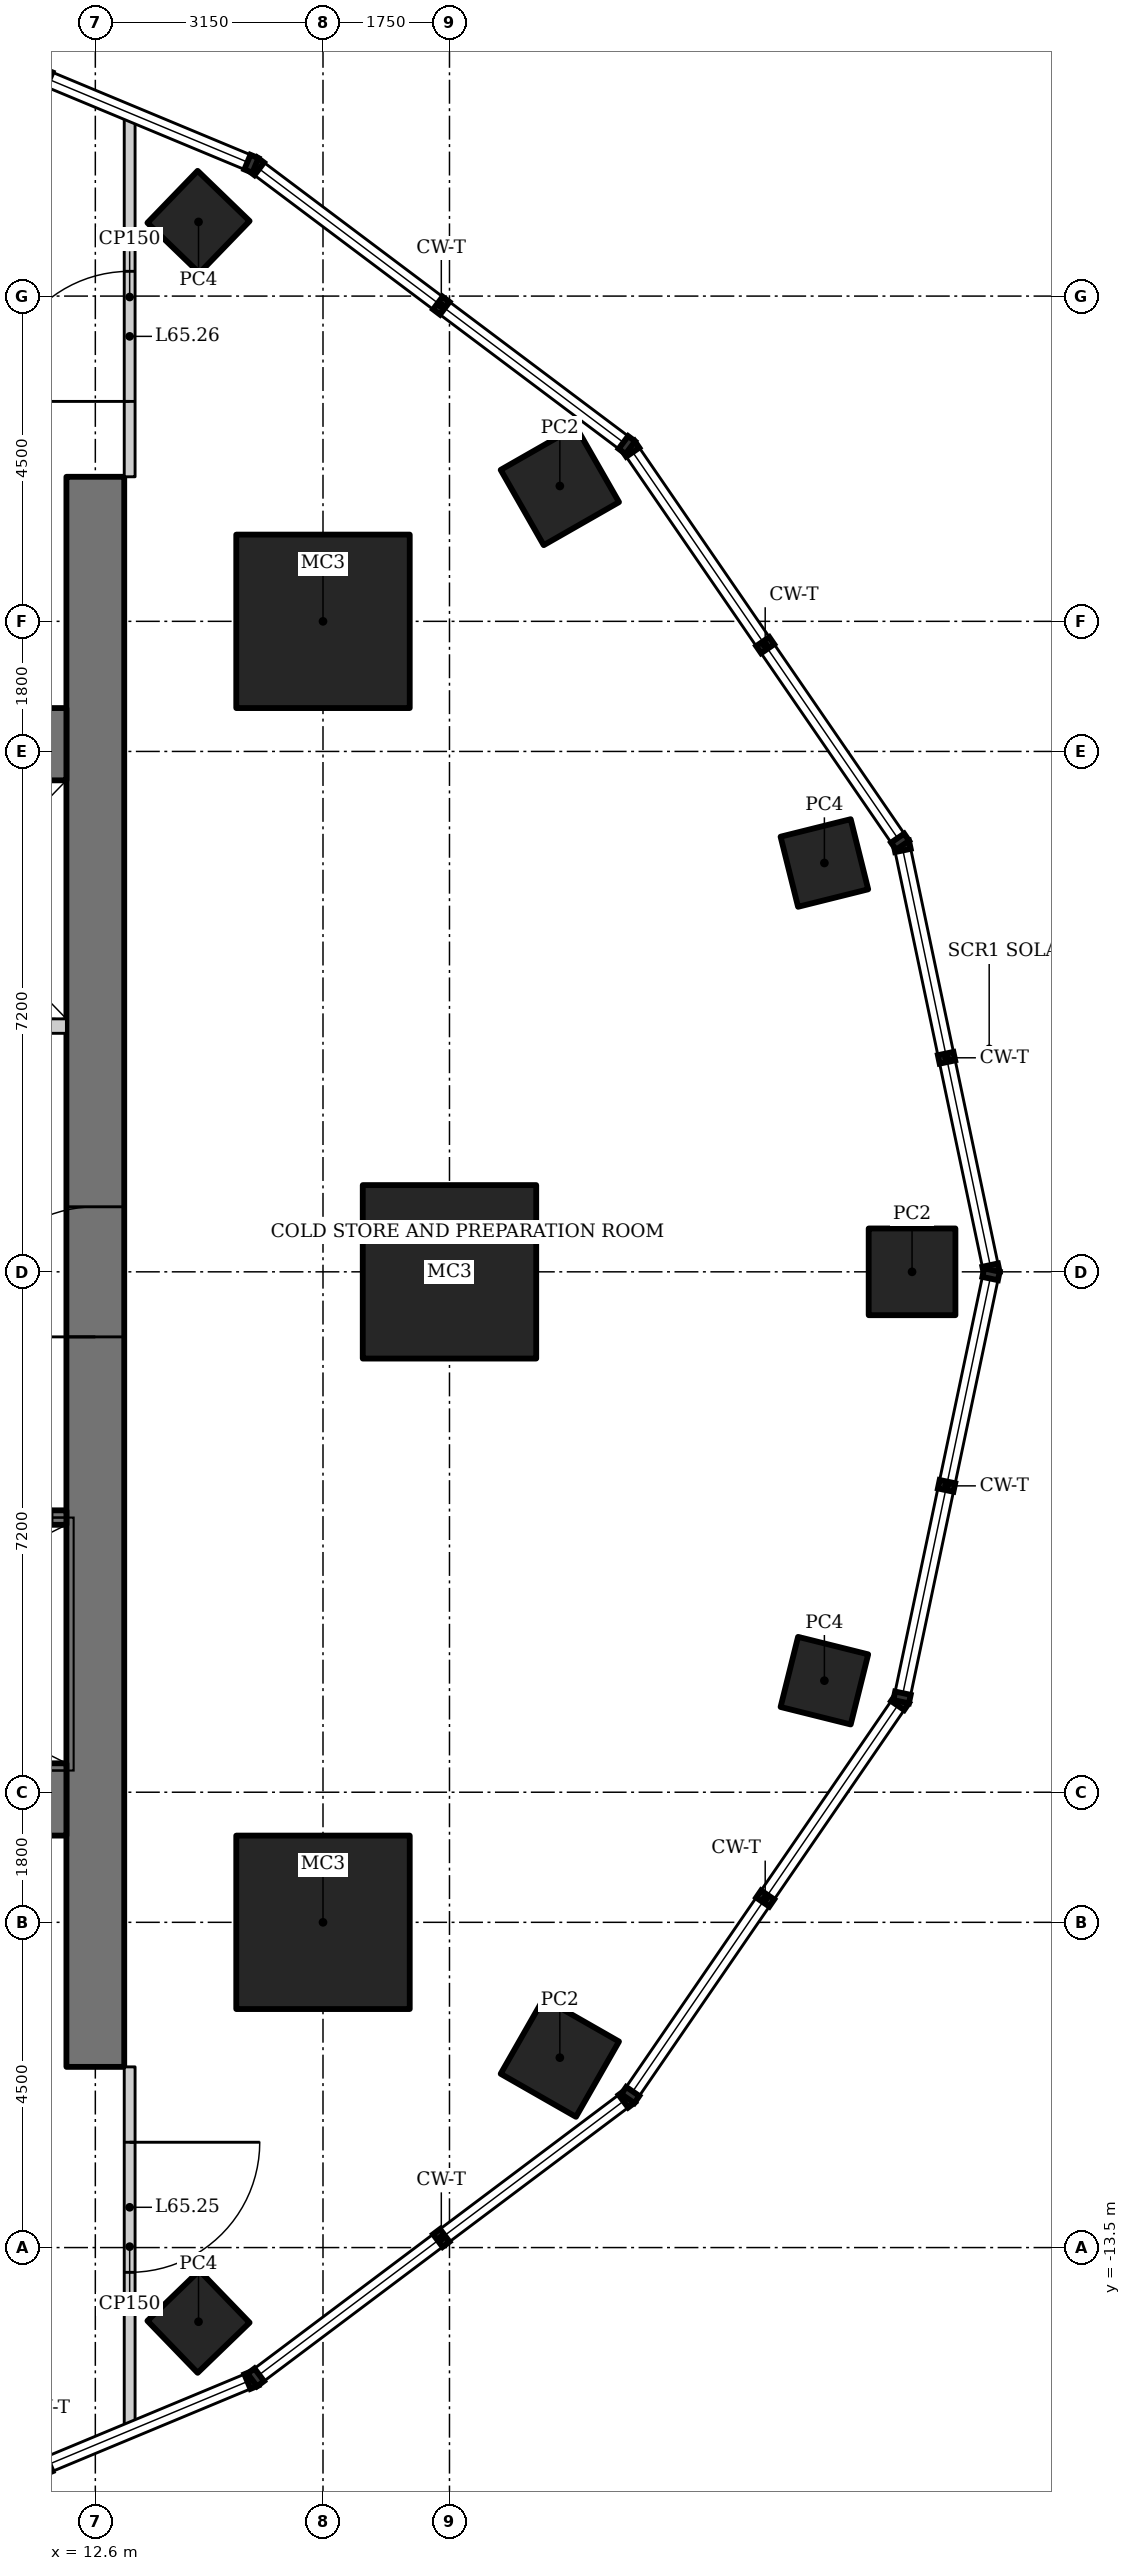
"""IFC4 building model, lengths in metres.
Left out: names, types, materials, properties, quantities, classifications, styles, units other than length and angle.
Written with IfcOpenShell. Run it as: python <this file> out.ifc"""

import sys

from ifc_helpers import new_model, si_unit, direction, frame, frame_2d, origin, origin_2d, place, context, subcontext, project, spatial, rectangle, hollow_rectangle, extrude, element, fill, save


model = new_model("IFC4")
c1 = context("Model", 3, precision=1e-05, world=origin(), true_north=direction((0.0, 1.0)))
c2 = subcontext(c1, "Body", "Model", "MODEL_VIEW")
j1 = project(units=[si_unit("LENGTHUNIT", "METRE"), si_unit("PLANEANGLEUNIT", "RADIAN")], contexts=[c1])
p1 = place(None, origin())
s1 = spatial("IfcSite", under=j1, at=p1, CompositionType="ELEMENT")
p2 = place(p1, origin())
s2 = spatial("IfcBuilding", under=s1, at=p2, CompositionType="ELEMENT")
p3 = place(p2, frame((0.0, 0.0, 279.4)))
s3 = spatial("IfcBuildingStorey", under=s2, at=p3, CompositionType="ELEMENT", Elevation=279.4)
for number, where, z_axis, x_axis in (
    (1, (17.5, 0.0, 0.0), (0.0, 0.0, 1.0), (1.0, 0.0, 0.0)),
    (2, (15.75, 9.0, 0.0), (0.0, 0.0, 1.0), (1.0, 0.0, 0.0)),
    (3, (15.75, -9.0, 0.0), (0.0, 0.0, 1.0), (1.0, 0.0, 0.0)),
):
    element("IfcColumn", number, at=place(p3, frame(where, z_axis=z_axis, x_axis=x_axis)), inside=s3, PredefinedType="COLUMN", context=c2, shape_type="SweptSolid", body=[
        extrude(hollow_rectangle(XDim=2.4, YDim=2.4, WallThickness=0.12, at=origin_2d()), origin(), (0.0, 0.0, 1.0), 5.0),
    ])
p4 = place(p3, frame((23.9, 0.0, 0.0), z_axis=(0.0, 0.0, 1.0), x_axis=(1.0, 0.0, 0.0)))
e4 = element("IfcColumn", 4, at=p4, inside=s3, PredefinedType="COLUMN", context=c2, shape_type="SweptSolid", body=[
    extrude(hollow_rectangle(XDim=1.2, YDim=1.2, WallThickness=0.1, at=origin_2d()), origin(), (0.0, 0.0, 1.0), 5.0),
])
p5 = place(p3, frame((22.687, 5.656, 0.0), z_axis=(0.0, 0.0, 1.0), x_axis=(0.970295726276, 0.2419218956, 0.0)))
e5 = element("IfcColumn", 5, at=p5, inside=s3, PredefinedType="COLUMN", context=c2, shape_type="SweptSolid", body=[
    extrude(hollow_rectangle(XDim=1.0, YDim=1.0, WallThickness=0.08, at=origin_2d()), origin(), (0.0, 0.0, 1.0), 5.0),
])
p6 = place(p3, frame((19.027, 10.873, 0.0), z_axis=(0.0, 0.0, 1.0), x_axis=(0.86824298017, 0.496139221777, 0.0)))
e6 = element("IfcColumn", 6, at=p6, inside=s3, PredefinedType="COLUMN", context=c2, shape_type="SweptSolid", body=[
    extrude(hollow_rectangle(XDim=1.2, YDim=1.2, WallThickness=0.1, at=origin_2d()), origin(), (0.0, 0.0, 1.0), 5.0),
])
for number, where, z_axis, x_axis in (
    (7, (14.028, 14.526, 0.0), (0.0, 0.0, 1.0), (0.695, 0.719, 0.0)),
    (8, (14.028, -14.526, 0.0), (0.0, 0.0, 1.0), (0.719, 0.695, 0.0)),
):
    element("IfcColumn", number, at=place(p3, frame(where, z_axis=z_axis, x_axis=x_axis)), inside=s3, PredefinedType="COLUMN", context=c2, shape_type="SweptSolid", body=[
        extrude(hollow_rectangle(XDim=1.0, YDim=1.0, WallThickness=0.08, at=origin_2d()), origin(), (0.0, 0.0, 1.0), 5.0),
    ])
p7 = place(p3, frame((19.027, -10.873, 0.0), z_axis=(0.0, 0.0, 1.0), x_axis=(0.496139221777, 0.86824298017, 0.0)))
e9 = element("IfcColumn", 9, at=p7, inside=s3, PredefinedType="COLUMN", context=c2, shape_type="SweptSolid", body=[
    extrude(hollow_rectangle(XDim=1.2, YDim=1.2, WallThickness=0.1, at=origin_2d()), origin(), (0.0, 0.0, 1.0), 5.0),
])
p8 = place(p3, frame((22.687, -5.656, 0.0), z_axis=(0.0, 0.0, 1.0), x_axis=(0.2419218956, 0.970295726276, 0.0)))
e10 = element("IfcColumn", 10, at=p8, inside=s3, PredefinedType="COLUMN", context=c2, shape_type="SweptSolid", body=[
    extrude(hollow_rectangle(XDim=1.0, YDim=1.0, WallThickness=0.08, at=origin_2d()), origin(), (0.0, 0.0, 1.0), 5.0),
])
p9 = place(p3, frame((12.6, -11.0, 0.0), z_axis=(0.0, 0.0, 1.0), x_axis=(0.0, 1.0, 0.0)))
e11 = element("IfcWall", 11, at=p9, inside=s3, PredefinedType="SHEAR", context=c2, shape_type="SweptSolid", body=[
    extrude(rectangle(XDim=22.0, YDim=0.8, at=frame_2d((11.0, 0.0))), origin(), (0.0, 0.0, 1.0), 5.0),
])
p10 = place(p9, frame((10.1, 0.0, 0.0)))
e12 = element("IfcOpeningElement", 12, at=p10, cuts=e11, PredefinedType="OPENING", context=c2, shape_type="SweptSolid", body=[
    extrude(rectangle(XDim=1.8, YDim=2.1, at=frame_2d((0.9, 1.05))), frame((0.0, 0.41, 0.0), z_axis=(0.0, -1.0, 0.0), x_axis=(1.0, 0.0, 0.0)), (0.0, 0.0, 1.0), 0.82),
])
p11 = place(p3, frame((-12.2, -7.3, 0.0), z_axis=(0.0, 0.0, 1.0), x_axis=(1.0, 0.0, 0.0)))
e13 = element("IfcWall", 13, at=p11, inside=s3, PredefinedType="SHEAR", context=c2, shape_type="SweptSolid", body=[
    extrude(rectangle(XDim=24.4, YDim=1.0, at=frame_2d((12.2, 0.0))), origin(), (0.0, 0.0, 1.0), 5.0),
])
p12 = place(p3, frame((12.2, 7.3, 0.0), z_axis=(0.0, 0.0, 1.0), x_axis=(-1.0, 0.0, 0.0)))
e14 = element("IfcWall", 14, at=p12, inside=s3, PredefinedType="SHEAR", context=c2, shape_type="SweptSolid", body=[
    extrude(rectangle(XDim=6.6, YDim=1.0, at=frame_2d((3.3, 0.0))), origin(), (0.0, 0.0, 1.0), 5.0),
])
p13 = place(p3, frame((5.6, -3.4, 0.0), z_axis=(0.0, 0.0, 1.0), x_axis=(1.0, 0.0, 0.0)))
e15 = element("IfcWall", 15, at=p13, inside=s3, PredefinedType="SHEAR", context=c2, shape_type="SweptSolid", body=[
    extrude(rectangle(XDim=6.6, YDim=0.2, at=frame_2d((3.3, 0.0))), origin(), (0.0, 0.0, 1.0), 5.0),
])
p14 = place(p13, frame((5.2, 0.0, 0.0)))
e16 = element("IfcOpeningElement", 16, at=p14, cuts=e15, PredefinedType="OPENING", context=c2, shape_type="SweptSolid", body=[
    extrude(rectangle(XDim=1.2, YDim=2.1, at=frame_2d((0.6, 1.05))), frame((0.0, 0.11, 0.0), z_axis=(0.0, -1.0, 0.0), x_axis=(1.0, 0.0, 0.0)), (0.0, 0.0, 1.0), 0.22),
])
p15 = place(p3, frame((12.2, 3.4, 0.0), z_axis=(0.0, 0.0, 1.0), x_axis=(-1.0, 0.0, 0.0)))
e17 = element("IfcWall", 17, at=p15, inside=s3, PredefinedType="SOLIDWALL", context=c2, shape_type="SweptSolid", body=[
    extrude(rectangle(XDim=6.6, YDim=0.2, at=frame_2d((3.3, 0.0))), origin(), (0.0, 0.0, 1.0), 5.0),
])
p16 = place(p15, frame((4.45, 0.0, 0.0)))
e18 = element("IfcOpeningElement", 18, at=p16, cuts=e17, PredefinedType="OPENING", context=c2, shape_type="SweptSolid", body=[
    extrude(rectangle(XDim=1.1, YDim=2.2, at=frame_2d((0.55, 1.1))), frame((0.0, 0.11, 0.0), z_axis=(0.0, -1.0, 0.0), x_axis=(1.0, 0.0, 0.0)), (0.0, 0.0, 1.0), 0.22),
])
p17 = place(p15, frame((0.9, 0.0, 0.0)))
e19 = element("IfcOpeningElement", 19, at=p17, cuts=e17, PredefinedType="OPENING", context=c2, shape_type="SweptSolid", body=[
    extrude(rectangle(XDim=1.4, YDim=2.2, at=frame_2d((0.7, 1.1))), frame((0.0, 0.11, 0.0), z_axis=(0.0, -1.0, 0.0), x_axis=(1.0, 0.0, 0.0)), (0.0, 0.0, 1.0), 0.22),
])
p18 = place(p3, frame((13.075, -11.0, 0.0), z_axis=(0.0, 0.0, 1.0), x_axis=(0.0, -1.0, 0.0)))
e20 = element("IfcWall", 20, at=p18, inside=s3, PredefinedType="PARTITIONING", context=c2, shape_type="SweptSolid", body=[
    extrude(rectangle(XDim=4.974, YDim=0.15, at=frame_2d((2.487, 0.0))), origin(), (0.0, 0.0, 1.0), 4.8),
])
p19 = place(p18, frame((1.043, 0.0, 0.0)))
e21 = element("IfcOpeningElement", 21, at=p19, cuts=e20, PredefinedType="OPENING", context=c2, shape_type="SweptSolid", body=[
    extrude(rectangle(XDim=1.8, YDim=2.1, at=frame_2d((0.9, 1.05))), frame((0.0, 0.085, 0.0), z_axis=(0.0, -1.0, 0.0), x_axis=(1.0, 0.0, 0.0)), (0.0, 0.0, 1.0), 0.17),
])
p20 = place(p3, frame((13.075, 11.0, 0.0), z_axis=(0.0, 0.0, 1.0), x_axis=(0.0, 1.0, 0.0)))
e22 = element("IfcWall", 22, at=p20, inside=s3, PredefinedType="PARTITIONING", context=c2, shape_type="SweptSolid", body=[
    extrude(rectangle(XDim=4.974, YDim=0.15, at=frame_2d((2.487, 0.0))), origin(), (0.0, 0.0, 1.0), 4.8),
])
p21 = place(p20, frame((1.043, 0.0, 0.0)))
e23 = element("IfcOpeningElement", 23, at=p21, cuts=e22, PredefinedType="OPENING", context=c2, shape_type="SweptSolid", body=[
    extrude(rectangle(XDim=1.8, YDim=2.1, at=frame_2d((0.9, 1.05))), frame((0.0, 0.085, 0.0), z_axis=(0.0, -1.0, 0.0), x_axis=(1.0, 0.0, 0.0)), (0.0, 0.0, 1.0), 0.17),
])
p22 = place(p14, origin())
e24 = element("IfcDoor", 24, at=p22, inside=s3, OperationType="SINGLE_SWING_RIGHT", PredefinedType="DOOR", context=c2, shape_type="SweptSolid", body=[
    extrude(rectangle(XDim=1.2, YDim=2.1, at=frame_2d((0.6, 1.05))), frame((0.0, 0.025, 0.0), z_axis=(0.0, -1.0, 0.0), x_axis=(1.0, 0.0, 0.0)), (0.0, 0.0, 1.0), 0.05),
])
fill(e16, e24)
p23 = place(p10, origin())
e25 = element("IfcDoor", 25, at=p23, inside=s3, OperationType="DOUBLE_DOOR_DOUBLE_SWING", PredefinedType="DOOR", context=c2, shape_type="SweptSolid", body=[
    extrude(rectangle(XDim=1.8, YDim=2.1, at=frame_2d((0.9, 1.05))), frame((0.0, 0.025, 0.0), z_axis=(0.0, -1.0, 0.0), x_axis=(1.0, 0.0, 0.0)), (0.0, 0.0, 1.0), 0.05),
])
fill(e12, e25)
p24 = place(p19, origin())
e26 = element("IfcDoor", 26, at=p24, inside=s3, OperationType="DOUBLE_DOOR_DOUBLE_SWING", PredefinedType="DOOR", context=c2, shape_type="SweptSolid", body=[
    extrude(rectangle(XDim=1.8, YDim=2.1, at=frame_2d((0.9, 1.05))), frame((0.0, 0.025, 0.0), z_axis=(0.0, -1.0, 0.0), x_axis=(1.0, 0.0, 0.0)), (0.0, 0.0, 1.0), 0.05),
])
fill(e21, e26)
p25 = place(p21, origin())
e27 = element("IfcDoor", 27, at=p25, inside=s3, OperationType="DOUBLE_DOOR_DOUBLE_SWING", PredefinedType="DOOR", context=c2, shape_type="SweptSolid", body=[
    extrude(rectangle(XDim=1.8, YDim=2.1, at=frame_2d((0.9, 1.05))), frame((0.0, 0.025, 0.0), z_axis=(0.0, -1.0, 0.0), x_axis=(1.0, 0.0, 0.0)), (0.0, 0.0, 1.0), 0.05),
])
fill(e23, e27)
save(model, sys.argv[1])
